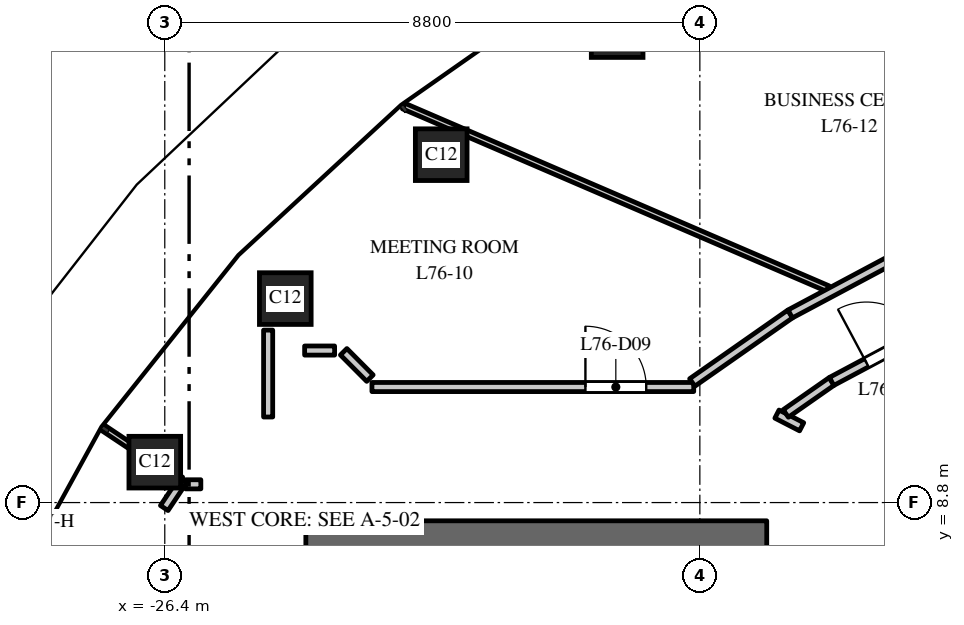
"""IFC4 building model, lengths in metres.
Left out: names, types, materials, properties, quantities, classifications, styles, units other than length and angle.
Written with IfcOpenShell. Run it as: python <this file> out.ifc"""

import sys

from ifc_helpers import new_model, si_unit, direction, frame, frame_2d, origin, origin_2d, place, context, subcontext, project, spatial, rectangle, extrude, element, fill, save


model = new_model("IFC4")
c1 = context("Model", 3, precision=1e-05, world=origin(), true_north=direction((0.0, 1.0)))
c2 = subcontext(c1, "Body", "Model", "MODEL_VIEW")
j1 = project(units=[si_unit("LENGTHUNIT", "METRE"), si_unit("PLANEANGLEUNIT", "RADIAN")], contexts=[c1])
p1 = place(None, origin())
s1 = spatial("IfcSite", under=j1, at=p1, CompositionType="ELEMENT")
p2 = place(p1, origin())
s2 = spatial("IfcBuilding", under=s1, at=p2, CompositionType="ELEMENT")
p3 = place(p2, frame((0.0, 0.0, 347.0)))
s3 = spatial("IfcBuildingStorey", under=s2, at=p3, CompositionType="ELEMENT", Elevation=347.0)
p4 = place(p3, frame((-15.813, 18.223, 0.021), z_axis=(0.28996437072, -0.468233413861, 0.834672471007), x_axis=(0.850179331562, 0.526493213807, 0.0)))
e1 = element("IfcColumn", 1, at=p4, inside=s3, PredefinedType="COLUMN", context=c2, shape_type="SweptSolid", body=[
    extrude(rectangle(XDim=0.85, YDim=0.85, at=origin_2d()), origin(), (0.0, 0.0, 1.0), 4.734),
])
p5 = place(p3, frame((-18.96, 16.545, 0.021), z_axis=(0.348267486207, -0.426502607868, 0.834748634939), x_axis=(0.774570364405, 0.632487747379, 0.0)))
e2 = element("IfcColumn", 2, at=p5, inside=s3, PredefinedType="COLUMN", context=c2, shape_type="SweptSolid", body=[
    extrude(rectangle(XDim=0.85, YDim=0.85, at=origin_2d()), origin(), (0.0, 0.0, 1.0), 4.734),
])
p6 = place(p3, frame((-21.854, 14.521, 0.021), z_axis=(0.402285560679, -0.375879123876, 0.834794113481), x_axis=(0.682718667605, 0.730681340192, 0.0)))
e3 = element("IfcColumn", 3, at=p6, inside=s3, PredefinedType="COLUMN", context=c2, shape_type="SweptSolid", body=[
    extrude(rectangle(XDim=0.85, YDim=0.85, at=origin_2d()), origin(), (0.0, 0.0, 1.0), 4.734),
])
p7 = place(p3, frame((-24.418, 12.154, 0.021), z_axis=(0.450739713419, -0.316171343674, 0.834787034031), x_axis=(0.574258734761, 0.81867387008, 0.0)))
e4 = element("IfcColumn", 4, at=p7, inside=s3, PredefinedType="COLUMN", context=c2, shape_type="SweptSolid", body=[
    extrude(rectangle(XDim=0.85, YDim=0.85, at=origin_2d()), origin(), (0.0, 0.0, 1.0), 4.744),
])
p8 = place(p3, frame((-26.564, 9.464, 0.021), z_axis=(0.491879634407, -0.247568905736, 0.834723943689), x_axis=(0.449578736033, 0.893240706701, 0.0)))
e5 = element("IfcColumn", 5, at=p8, inside=s3, PredefinedType="COLUMN", context=c2, shape_type="SweptSolid", body=[
    extrude(rectangle(XDim=0.85, YDim=0.85, at=origin_2d()), origin(), (0.0, 0.0, 1.0), 4.646),
])
p9 = place(p3, frame((-16.5, 8.25, 0.0), z_axis=(0.0, 0.0, 1.0), x_axis=(-1.0, 0.0, 0.0)))
e6 = element("IfcWall", 6, at=p9, inside=s3, PredefinedType="SHEAR", context=c2, shape_type="SweptSolid", body=[
    extrude(rectangle(XDim=7.58, YDim=0.5, at=frame_2d((3.79, 0.0))), origin(), (0.0, 0.0, 1.0), 3.7),
])
p10 = place(p3, frame((-27.412, 10.027, 0.0), z_axis=(0.0, 0.0, 1.0), x_axis=(0.832245757536, -0.554406889445, 0.0)))
e7 = element("IfcWall", 7, at=p10, inside=s3, PredefinedType="PARTITIONING", context=c2, shape_type="SweptSolid", body=[
    extrude(rectangle(XDim=1.537, YDim=0.1, at=frame_2d((0.769, 0.0))), origin(), (0.0, 0.0, 1.0), 3.7),
])
p11 = place(p3, frame((-26.409, 8.71, 0.0), z_axis=(0.0, 0.0, 1.0), x_axis=(0.555907960912, 0.8312438505, 0.0)))
e8 = element("IfcWall", 8, at=p11, inside=s3, PredefinedType="PARTITIONING", context=c2, shape_type="SweptSolid", body=[
    extrude(rectangle(XDim=0.56, YDim=0.15, at=frame_2d((0.28, 0.0))), origin(), (0.0, 0.0, 1.0), 3.7),
])
p12 = place(p3, frame((-26.058, 9.1, 0.0), z_axis=(0.0, 0.0, 1.0), x_axis=(1.0, 0.0, 0.0)))
e9 = element("IfcWall", 9, at=p12, inside=s3, PredefinedType="PARTITIONING", context=c2, shape_type="SweptSolid", body=[
    extrude(rectangle(XDim=0.251, YDim=0.15, at=frame_2d((0.125, 0.0))), origin(), (0.0, 0.0, 1.0), 3.7),
])
p13 = place(p3, frame((-24.7, 10.207, 0.0), z_axis=(0.0, 0.0, 1.0), x_axis=(0.0, 1.0, 0.0)))
e10 = element("IfcWall", 10, at=p13, inside=s3, PredefinedType="PARTITIONING", context=c2, shape_type="SweptSolid", body=[
    extrude(rectangle(XDim=1.429, YDim=0.15, at=frame_2d((0.714, 0.0))), origin(), (0.0, 0.0, 1.0), 3.7),
])
p14 = place(p3, frame((-24.1, 11.3, 0.0), z_axis=(0.0, 0.0, 1.0), x_axis=(1.0, 0.0, 0.0)))
e11 = element("IfcWall", 11, at=p14, inside=s3, PredefinedType="PARTITIONING", context=c2, shape_type="SweptSolid", body=[
    extrude(rectangle(XDim=0.493, YDim=0.15, at=frame_2d((0.247, 0.0))), origin(), (0.0, 0.0, 1.0), 3.7),
])
p15 = place(p3, frame((-22.993, 10.7, 0.0), z_axis=(0.0, 0.0, 1.0), x_axis=(1.0, 0.0, 0.0)))
e12 = element("IfcWall", 12, at=p15, inside=s3, PredefinedType="PARTITIONING", context=c2, shape_type="SweptSolid", body=[
    extrude(rectangle(XDim=5.292, YDim=0.15, at=frame_2d((2.646, 0.0))), origin(), (0.0, 0.0, 1.0), 3.0),
])
p16 = place(p15, frame((3.511, 0.0, 0.0)))
e13 = element("IfcOpeningElement", 13, at=p16, cuts=e12, PredefinedType="OPENING", context=c2, shape_type="SweptSolid", body=[
    extrude(rectangle(XDim=1.0, YDim=2.1, at=frame_2d((0.5, 1.05))), frame((0.0, 0.085, 0.0), z_axis=(0.0, -1.0, 0.0), x_axis=(1.0, 0.0, 0.0)), (0.0, 0.0, 1.0), 0.17),
])
p17 = place(p3, frame((-22.472, 15.321, 0.0), z_axis=(0.0, 0.0, 1.0), x_axis=(0.918555554777, -0.395291908326, 0.0)))
e14 = element("IfcWall", 14, at=p17, inside=s3, PredefinedType="PARTITIONING", context=c2, shape_type="SweptSolid", body=[
    extrude(rectangle(XDim=7.597, YDim=0.1, at=frame_2d((3.798, 0.0))), origin(), (0.0, 0.0, 1.0), 3.0),
])
p18 = place(p3, frame((-17.725, 10.775, 0.0), z_axis=(0.0, 0.0, 1.0), x_axis=(0.819366063165, 0.573270664288, 0.0)))
e15 = element("IfcWall", 15, at=p18, inside=s3, PredefinedType="PARTITIONING", context=c2, shape_type="SweptSolid", body=[
    extrude(rectangle(XDim=1.966, YDim=0.15, at=frame_2d((0.983, 0.0))), origin(), (0.0, 0.0, 1.0), 2.95),
])
p19 = place(p3, frame((-16.332, 10.255, 0.0), z_axis=(0.0, 0.0, 1.0), x_axis=(0.889126212235, -0.457662079178, 0.0)))
e16 = element("IfcWall", 16, at=p19, inside=s3, PredefinedType="PARTITIONING", context=c2, shape_type="SweptSolid", body=[
    extrude(rectangle(XDim=0.457, YDim=0.15, at=frame_2d((0.228, 0.0))), origin(), (0.0, 0.0, 1.0), 3.7),
])
p20 = place(p3, frame((-16.187, 10.265, 0.0), z_axis=(0.0, 0.0, 1.0), x_axis=(0.819555969789, 0.572999138204, 0.0)))
e17 = element("IfcWall", 17, at=p20, inside=s3, PredefinedType="PARTITIONING", context=c2, shape_type="SweptSolid", body=[
    extrude(rectangle(XDim=0.92, YDim=0.15, at=frame_2d((0.46, 0.0))), origin(), (0.0, 0.0, 1.0), 2.95),
])
p21 = place(p3, frame((-16.114, 11.902, 0.0), z_axis=(0.0, 0.0, 1.0), x_axis=(0.882371338396, 0.470553738883, 0.0)))
e18 = element("IfcWall", 18, at=p21, inside=s3, PredefinedType="PARTITIONING", context=c2, shape_type="SweptSolid", body=[
    extrude(rectangle(XDim=2.939, YDim=0.15, at=frame_2d((1.469, 0.0))), origin(), (0.0, 0.0, 1.0), 3.7),
])
p22 = place(p3, frame((-15.433, 10.792, 0.0), z_axis=(0.0, 0.0, 1.0), x_axis=(0.882445003112, 0.470415578487, 0.0)))
e19 = element("IfcWall", 19, at=p22, inside=s3, PredefinedType="PARTITIONING", context=c2, shape_type="SweptSolid", body=[
    extrude(rectangle(XDim=2.789, YDim=0.15, at=frame_2d((1.395, 0.0))), origin(), (0.0, 0.0, 1.0), 3.7),
])
p23 = place(p22, frame((0.65, 0.0, 0.0)))
e20 = element("IfcOpeningElement", 20, at=p23, cuts=e19, PredefinedType="OPENING", context=c2, shape_type="SweptSolid", body=[
    extrude(rectangle(XDim=1.0, YDim=2.1, at=frame_2d((0.5, 1.05))), frame((0.0, 0.085, 0.0), z_axis=(0.0, -1.0, 0.0), x_axis=(1.0, 0.0, 0.0)), (0.0, 0.0, 1.0), 0.17),
])
p24 = place(p3, frame((-23.458, 11.28, 0.0), z_axis=(0.0, 0.0, 1.0), x_axis=(0.70551060944, -0.708699357957, 0.0)))
e21 = element("IfcWall", 21, at=p24, inside=s3, PredefinedType="PARTITIONING", context=c2, shape_type="SweptSolid", body=[
    extrude(rectangle(XDim=0.613, YDim=0.15, at=frame_2d((0.306, 0.0))), origin(), (0.0, 0.0, 1.0), 3.7),
])
p25 = place(p23, origin())
e22 = element("IfcDoor", 22, at=p25, inside=s3, OperationType="SINGLE_SWING_LEFT", PredefinedType="DOOR", context=c2, shape_type="SweptSolid", body=[
    extrude(rectangle(XDim=1.0, YDim=2.1, at=frame_2d((0.5, 1.05))), frame((0.0, 0.025, 0.0), z_axis=(0.0, -1.0, 0.0), x_axis=(1.0, 0.0, 0.0)), (0.0, 0.0, 1.0), 0.05),
])
fill(e20, e22)
p26 = place(p16, origin())
e23 = element("IfcDoor", 23, at=p26, inside=s3, OperationType="SINGLE_SWING_LEFT", PredefinedType="DOOR", context=c2, shape_type="SweptSolid", body=[
    extrude(rectangle(XDim=1.0, YDim=2.1, at=frame_2d((0.5, 1.05))), frame((0.0, 0.025, 0.0), z_axis=(0.0, -1.0, 0.0), x_axis=(1.0, 0.0, 0.0)), (0.0, 0.0, 1.0), 0.05),
])
fill(e13, e23)
save(model, sys.argv[1])
